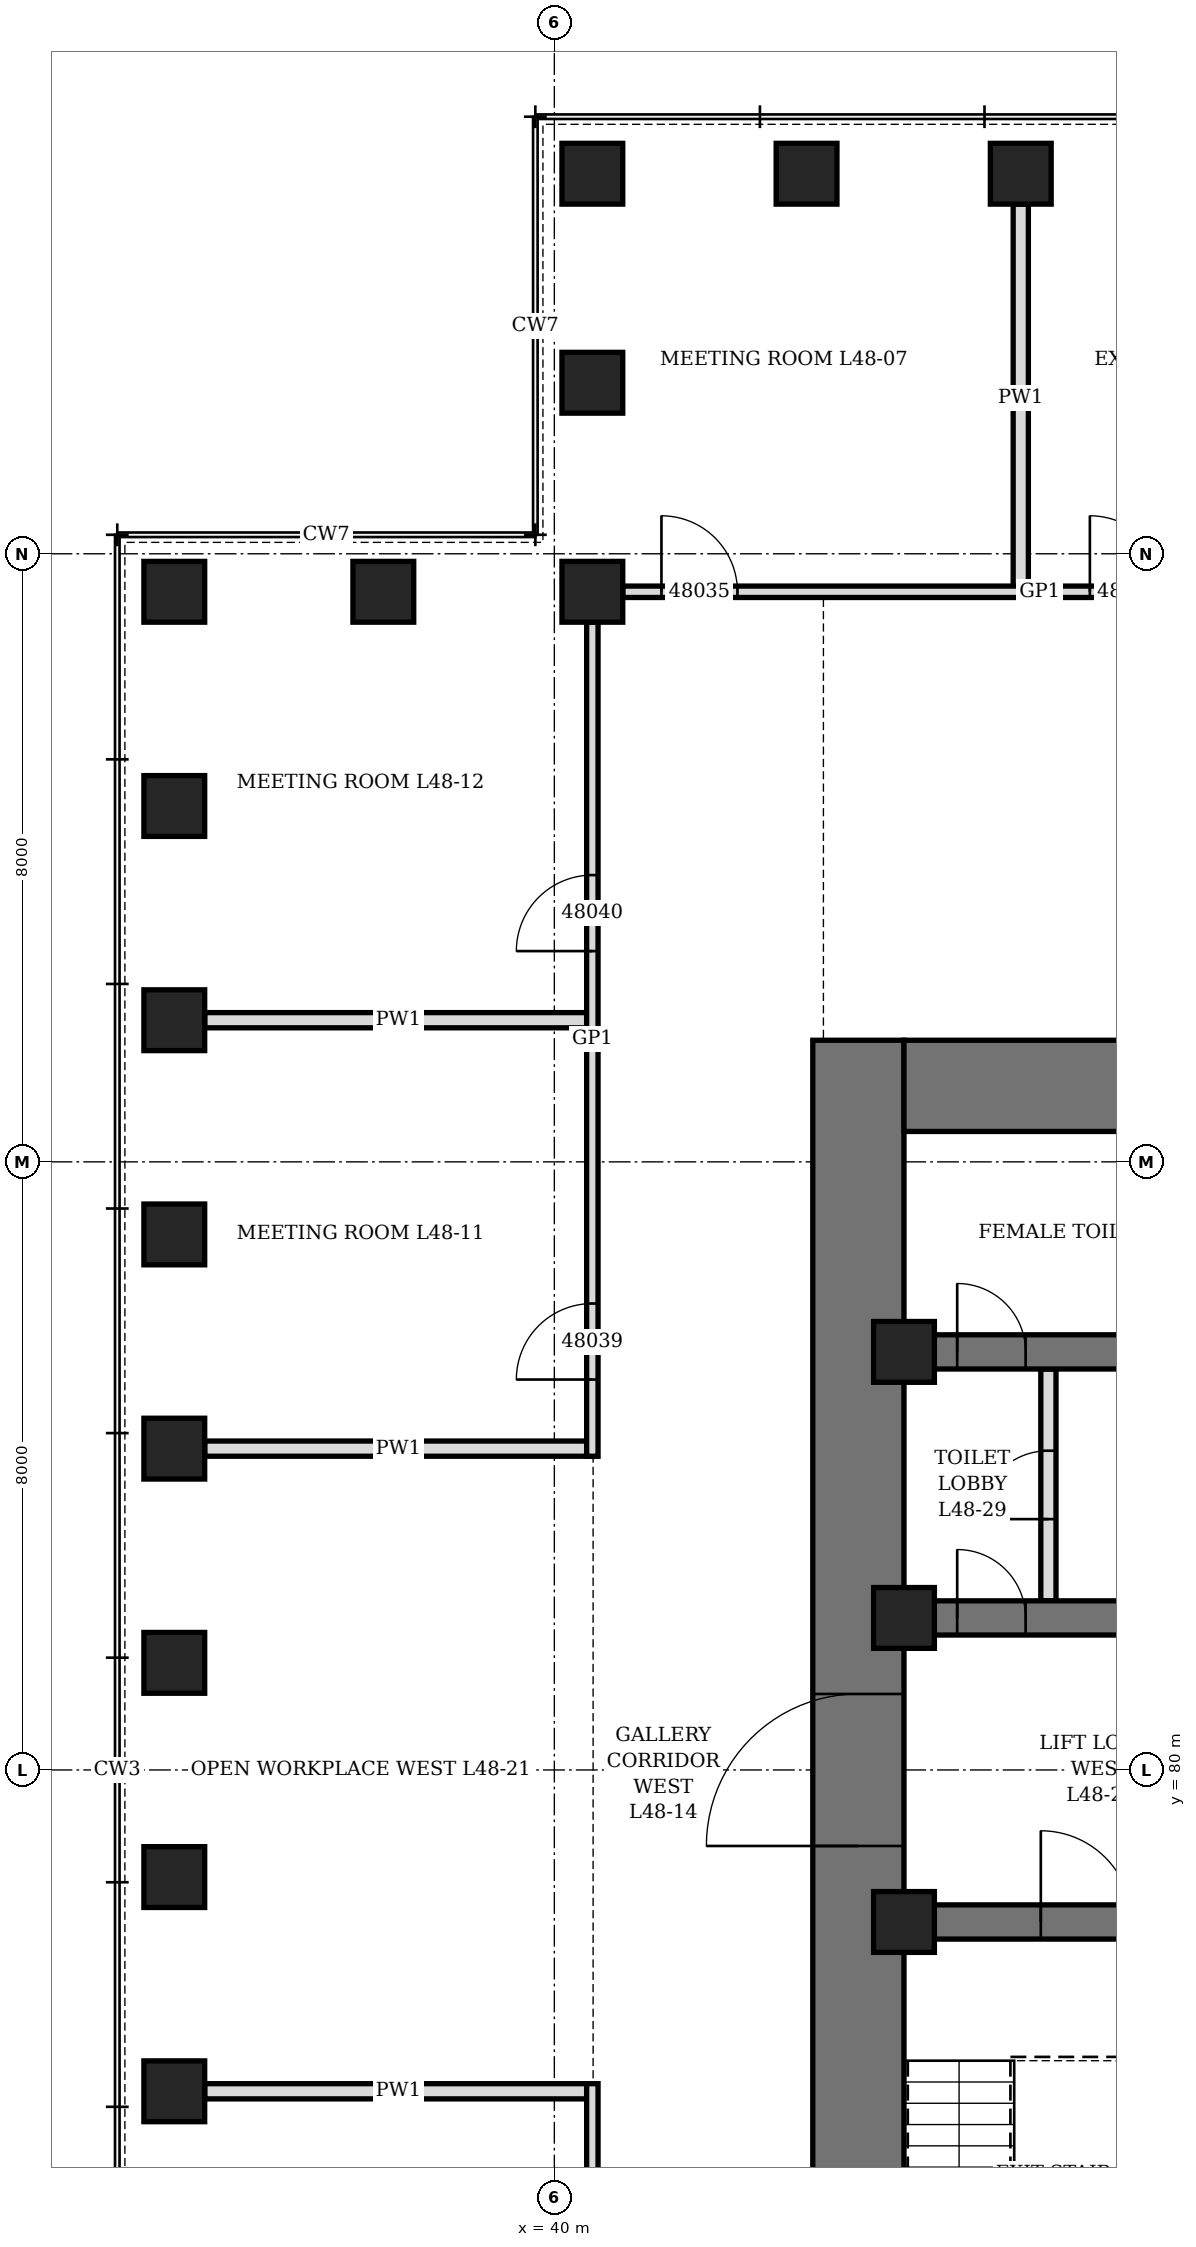
"""IFC4 building model, lengths in metres.
Left out: names, types, materials, properties, quantities, classifications, styles, units other than length and angle.
Written with IfcOpenShell. Run it as: python <this file> out.ifc"""

import sys

from ifc_helpers import new_model, si_unit, direction, frame, frame_2d, origin, origin_2d, place, context, subcontext, project, spatial, rectangle, hollow_rectangle, extrude, element, fill, save


model = new_model("IFC4")
c1 = context("Model", 3, precision=1e-05, world=origin(), true_north=direction((0.0, 1.0)))
c2 = subcontext(c1, "Body", "Model", "MODEL_VIEW")
j1 = project(units=[si_unit("LENGTHUNIT", "METRE"), si_unit("PLANEANGLEUNIT", "RADIAN")], contexts=[c1])
p1 = place(None, origin())
s1 = spatial("IfcSite", under=j1, at=p1, CompositionType="ELEMENT")
p2 = place(p1, origin())
s2 = spatial("IfcBuilding", under=s1, at=p2, CompositionType="ELEMENT")
p3 = place(p2, frame((0.0, 0.0, 214.9)))
s3 = spatial("IfcBuildingStorey", under=s2, at=p3, CompositionType="ELEMENT", Elevation=214.9)
for number, where, z_axis, x_axis in (
    (1, (46.136, 101.0, 0.0), (0.0, 0.0, 1.0), (1.0, 0.0, 0.0)),
    (2, (43.318, 101.0, 0.0), (0.0, 0.0, 1.0), (1.0, 0.0, 0.0)),
    (3, (40.5, 101.0, 0.0), (0.0, 0.0, 1.0), (0.0, 1.0, 0.0)),
    (4, (40.5, 98.25, 0.0), (0.0, 0.0, 1.0), (0.0, 1.0, 0.0)),
    (5, (40.5, 95.5, 0.0), (0.0, 0.0, 1.0), (1.0, 0.0, 0.0)),
    (6, (37.75, 95.5, 0.0), (0.0, 0.0, 1.0), (1.0, 0.0, 0.0)),
    (7, (35.0, 95.5, 0.0), (0.0, 0.0, 1.0), (0.0, 1.0, 0.0)),
    (8, (35.0, 92.682, 0.0), (0.0, 0.0, 1.0), (0.0, 1.0, 0.0)),
    (9, (35.0, 89.864, 0.0), (0.0, 0.0, 1.0), (0.0, 1.0, 0.0)),
    (10, (35.0, 87.045, 0.0), (0.0, 0.0, 1.0), (0.0, 1.0, 0.0)),
    (11, (35.0, 84.227, 0.0), (0.0, 0.0, 1.0), (0.0, 1.0, 0.0)),
    (12, (35.0, 81.409, 0.0), (0.0, 0.0, 1.0), (0.0, 1.0, 0.0)),
    (13, (35.0, 78.591, 0.0), (0.0, 0.0, 1.0), (0.0, 1.0, 0.0)),
    (14, (35.0, 75.773, 0.0), (0.0, 0.0, 1.0), (0.0, 1.0, 0.0)),
):
    element("IfcColumn", number, at=place(p3, frame(where, z_axis=z_axis, x_axis=x_axis)), inside=s3, PredefinedType="COLUMN", context=c2, shape_type="SweptSolid", body=[
        extrude(hollow_rectangle(XDim=0.8, YDim=0.8, WallThickness=0.08, at=origin_2d()), origin(), (0.0, 0.0, 1.0), 4.2),
    ])
p4 = place(p3, frame((44.0, 70.4, 0.0), z_axis=(0.0, 0.0, 1.0), x_axis=(0.0, 1.0, 0.0)))
e15 = element("IfcWall", 15, at=p4, inside=s3, PredefinedType="SHEAR", context=c2, shape_type="SweptSolid", body=[
    extrude(rectangle(XDim=19.2, YDim=1.2, at=frame_2d((9.6, 0.0))), origin(), (0.0, 0.0, 1.0), 4.2),
])
p5 = place(p4, frame((8.6, 0.0, 0.0)))
e16 = element("IfcOpeningElement", 16, at=p5, cuts=e15, PredefinedType="OPENING", context=c2, shape_type="SweptSolid", body=[
    extrude(rectangle(XDim=2.0, YDim=2.4, at=frame_2d((1.0, 1.2))), frame((0.0, 0.61, 0.0), z_axis=(0.0, -1.0, 0.0), x_axis=(1.0, 0.0, 0.0)), (0.0, 0.0, 1.0), 1.22),
])
p6 = place(p3, frame((44.6, 89.0, 0.0), z_axis=(0.0, 0.0, 1.0), x_axis=(1.0, 0.0, 0.0)))
e17 = element("IfcWall", 17, at=p6, inside=s3, PredefinedType="SHEAR", context=c2, shape_type="SweptSolid", body=[
    extrude(rectangle(XDim=22.8, YDim=1.2, at=frame_2d((11.4, 0.0))), origin(), (0.0, 0.0, 1.0), 4.2),
])
p7 = place(p6, frame((7.9, 0.0, 0.0)))
e18 = element("IfcOpeningElement", 18, at=p7, cuts=e17, PredefinedType="OPENING", context=c2, shape_type="SweptSolid", body=[
    extrude(rectangle(XDim=1.0, YDim=2.1, at=frame_2d((0.5, 1.05))), frame((0.0, 0.61, 0.0), z_axis=(0.0, -1.0, 0.0), x_axis=(1.0, 0.0, 0.0)), (0.0, 0.0, 1.0), 1.22),
])
p8 = place(p6, frame((12.025, 0.0, 0.0)))
e19 = element("IfcOpeningElement", 19, at=p8, cuts=e17, PredefinedType="OPENING", context=c2, shape_type="SweptSolid", body=[
    extrude(rectangle(XDim=0.9, YDim=2.1, at=frame_2d((0.45, 1.05))), frame((0.0, 0.61, 0.0), z_axis=(0.0, -1.0, 0.0), x_axis=(1.0, 0.0, 0.0)), (0.0, 0.0, 1.0), 1.22),
])
p9 = place(p6, frame((13.962, 0.0, 0.0)))
e20 = element("IfcOpeningElement", 20, at=p9, cuts=e17, PredefinedType="OPENING", context=c2, shape_type="SweptSolid", body=[
    extrude(rectangle(XDim=0.9, YDim=2.1, at=frame_2d((0.45, 1.05))), frame((0.0, 0.61, 0.0), z_axis=(0.0, -1.0, 0.0), x_axis=(1.0, 0.0, 0.0)), (0.0, 0.0, 1.0), 1.22),
])
p10 = place(p3, frame((44.6, 78.0, 0.0), z_axis=(0.0, 0.0, 1.0), x_axis=(1.0, 0.0, 0.0)))
e21 = element("IfcWall", 21, at=p10, inside=s3, PredefinedType="SHEAR", context=c2, shape_type="SweptSolid", body=[
    extrude(rectangle(XDim=5.175, YDim=0.45, at=frame_2d((2.587, 0.0))), origin(), (0.0, 0.0, 1.0), 4.2),
])
p11 = place(p10, frame((1.8, 0.0, 0.0)))
e22 = element("IfcOpeningElement", 22, at=p11, cuts=e21, PredefinedType="OPENING", context=c2, shape_type="SweptSolid", body=[
    extrude(rectangle(XDim=1.2, YDim=2.1, at=frame_2d((0.6, 1.05))), frame((0.0, 0.235, 0.0), z_axis=(0.0, -1.0, 0.0), x_axis=(1.0, 0.0, 0.0)), (0.0, 0.0, 1.0), 0.47),
])
p12 = place(p3, frame((44.6, 82.0, 0.0), z_axis=(0.0, 0.0, 1.0), x_axis=(1.0, 0.0, 0.0)))
e23 = element("IfcWall", 23, at=p12, inside=s3, PredefinedType="SHEAR", context=c2, shape_type="SweptSolid", body=[
    extrude(rectangle(XDim=5.175, YDim=0.45, at=frame_2d((2.587, 0.0))), origin(), (0.0, 0.0, 1.0), 4.2),
])
p13 = place(p12, frame((0.7, 0.0, 0.0)))
e24 = element("IfcOpeningElement", 24, at=p13, cuts=e23, PredefinedType="OPENING", context=c2, shape_type="SweptSolid", body=[
    extrude(rectangle(XDim=0.9, YDim=2.1, at=frame_2d((0.45, 1.05))), frame((0.0, 0.235, 0.0), z_axis=(0.0, -1.0, 0.0), x_axis=(1.0, 0.0, 0.0)), (0.0, 0.0, 1.0), 0.47),
])
p14 = place(p3, frame((44.6, 85.5, 0.0), z_axis=(0.0, 0.0, 1.0), x_axis=(1.0, 0.0, 0.0)))
e25 = element("IfcWall", 25, at=p14, inside=s3, PredefinedType="SHEAR", context=c2, shape_type="SweptSolid", body=[
    extrude(rectangle(XDim=5.175, YDim=0.45, at=frame_2d((2.587, 0.0))), origin(), (0.0, 0.0, 1.0), 4.2),
])
p15 = place(p14, frame((0.7, 0.0, 0.0)))
e26 = element("IfcOpeningElement", 26, at=p15, cuts=e25, PredefinedType="OPENING", context=c2, shape_type="SweptSolid", body=[
    extrude(rectangle(XDim=0.9, YDim=2.1, at=frame_2d((0.45, 1.05))), frame((0.0, 0.235, 0.0), z_axis=(0.0, -1.0, 0.0), x_axis=(1.0, 0.0, 0.0)), (0.0, 0.0, 1.0), 0.47),
])
for number, where, z_axis, x_axis in (
    (27, (44.6, 78.0, 0.0), (0.0, 0.0, 1.0), (1.0, 0.0, 0.0)),
    (28, (44.6, 82.0, 0.0), (0.0, 0.0, 1.0), (1.0, 0.0, 0.0)),
    (29, (44.6, 85.5, 0.0), (0.0, 0.0, 1.0), (1.0, 0.0, 0.0)),
):
    element("IfcColumn", number, at=place(p3, frame(where, z_axis=z_axis, x_axis=x_axis)), inside=s3, PredefinedType="COLUMN", context=c2, shape_type="SweptSolid", body=[
        extrude(hollow_rectangle(XDim=0.8, YDim=0.8, WallThickness=0.1, at=origin_2d()), origin(), (0.0, 0.0, 1.0), 4.2),
    ])
p16 = place(p3, frame((46.5, 82.225, 0.0), z_axis=(0.0, 0.0, 1.0), x_axis=(0.0, 1.0, 0.0)))
e30 = element("IfcWall", 30, at=p16, inside=s3, PredefinedType="PARTITIONING", context=c2, shape_type="SweptSolid", body=[
    extrude(rectangle(XDim=3.05, YDim=0.2, at=frame_2d((1.525, 0.0))), origin(), (0.0, 0.0, 1.0), 4.04),
])
p17 = place(p16, frame((1.075, 0.0, 0.0)))
e31 = element("IfcOpeningElement", 31, at=p17, cuts=e30, PredefinedType="OPENING", context=c2, shape_type="SweptSolid", body=[
    extrude(rectangle(XDim=0.9, YDim=2.1, at=frame_2d((0.45, 1.05))), frame((0.0, 0.11, 0.0), z_axis=(0.0, -1.0, 0.0), x_axis=(1.0, 0.0, 0.0)), (0.0, 0.0, 1.0), 0.22),
])
for number, where, z_axis, x_axis in (
    (32, (46.136, 95.5, 0.0), (0.0, 0.0, 1.0), (0.0, 1.0, 0.0)),
    (33, (35.4, 75.773, 0.0), (0.0, 0.0, 1.0), (1.0, 0.0, 0.0)),
    (34, (35.4, 84.227, 0.0), (0.0, 0.0, 1.0), (1.0, 0.0, 0.0)),
    (35, (35.4, 89.864, 0.0), (0.0, 0.0, 1.0), (1.0, 0.0, 0.0)),
):
    element("IfcWall", number, at=place(p3, frame(where, z_axis=z_axis, x_axis=x_axis)), inside=s3, PredefinedType="PARTITIONING", context=c2, shape_type="SweptSolid", body=[
        extrude(rectangle(XDim=5.1, YDim=0.2, at=frame_2d((2.55, 0.0))), origin(), (0.0, 0.0, 1.0), 3.428),
    ])
p18 = place(p3, frame((40.9, 95.5, 0.0), z_axis=(0.0, 0.0, 1.0), x_axis=(1.0, 0.0, 0.0)))
e36 = element("IfcWall", 36, at=p18, inside=s3, PredefinedType="PARTITIONING", context=c2, shape_type="SweptSolid", body=[
    extrude(rectangle(XDim=10.973, YDim=0.15, at=frame_2d((5.486, 0.0))), origin(), (0.0, 0.0, 1.0), 4.04),
])
p19 = place(p18, frame((0.509, 0.0, 0.0)))
e37 = element("IfcOpeningElement", 37, at=p19, cuts=e36, PredefinedType="OPENING", context=c2, shape_type="SweptSolid", body=[
    extrude(rectangle(XDim=1.0, YDim=2.4, at=frame_2d((0.5, 1.2))), frame((0.0, 0.085, 0.0), z_axis=(0.0, -1.0, 0.0), x_axis=(1.0, 0.0, 0.0)), (0.0, 0.0, 1.0), 0.17),
])
p20 = place(p18, frame((6.146, 0.0, 0.0)))
e38 = element("IfcOpeningElement", 38, at=p20, cuts=e36, PredefinedType="OPENING", context=c2, shape_type="SweptSolid", body=[
    extrude(rectangle(XDim=1.0, YDim=2.1, at=frame_2d((0.5, 1.05))), frame((0.0, 0.085, 0.0), z_axis=(0.0, -1.0, 0.0), x_axis=(1.0, 0.0, 0.0)), (0.0, 0.0, 1.0), 0.17),
])
p21 = place(p3, frame((40.5, 64.9, 0.0), z_axis=(0.0, 0.0, 1.0), x_axis=(0.0, 1.0, 0.0)))
e39 = element("IfcWall", 39, at=p21, inside=s3, PredefinedType="PARTITIONING", context=c2, shape_type="SweptSolid", body=[
    extrude(rectangle(XDim=10.973, YDim=0.15, at=frame_2d((5.486, 0.0))), origin(), (0.0, 0.0, 1.0), 4.04),
])
p22 = place(p21, frame((3.327, 0.0, 0.0)))
e40 = element("IfcOpeningElement", 40, at=p22, cuts=e39, PredefinedType="OPENING", context=c2, shape_type="SweptSolid", body=[
    extrude(rectangle(XDim=1.0, YDim=2.4, at=frame_2d((0.5, 1.2))), frame((0.0, 0.085, 0.0), z_axis=(0.0, -1.0, 0.0), x_axis=(1.0, 0.0, 0.0)), (0.0, 0.0, 1.0), 0.17),
])
p23 = place(p3, frame((40.5, 84.127, 0.0), z_axis=(0.0, 0.0, 1.0), x_axis=(0.0, 1.0, 0.0)))
e41 = element("IfcWall", 41, at=p23, inside=s3, PredefinedType="PARTITIONING", context=c2, shape_type="SweptSolid", body=[
    extrude(rectangle(XDim=10.973, YDim=0.15, at=frame_2d((5.486, 0.0))), origin(), (0.0, 0.0, 1.0), 4.04),
])
p24 = place(p23, frame((1.009, 0.0, 0.0)))
e42 = element("IfcOpeningElement", 42, at=p24, cuts=e41, PredefinedType="OPENING", context=c2, shape_type="SweptSolid", body=[
    extrude(rectangle(XDim=1.0, YDim=2.4, at=frame_2d((0.5, 1.2))), frame((0.0, 0.085, 0.0), z_axis=(0.0, -1.0, 0.0), x_axis=(1.0, 0.0, 0.0)), (0.0, 0.0, 1.0), 0.17),
])
p25 = place(p23, frame((6.646, 0.0, 0.0)))
e43 = element("IfcOpeningElement", 43, at=p25, cuts=e41, PredefinedType="OPENING", context=c2, shape_type="SweptSolid", body=[
    extrude(rectangle(XDim=1.0, YDim=2.4, at=frame_2d((0.5, 1.2))), frame((0.0, 0.085, 0.0), z_axis=(0.0, -1.0, 0.0), x_axis=(1.0, 0.0, 0.0)), (0.0, 0.0, 1.0), 0.17),
])
p26 = place(p13, origin())
e44 = element("IfcDoor", 44, at=p26, inside=s3, OperationType="SINGLE_SWING_LEFT", PredefinedType="DOOR", context=c2, shape_type="SweptSolid", body=[
    extrude(rectangle(XDim=0.9, YDim=2.1, at=frame_2d((0.45, 1.05))), frame((0.0, 0.225, 0.0), z_axis=(0.0, -1.0, 0.0), x_axis=(1.0, 0.0, 0.0)), (0.0, 0.0, 1.0), 0.449),
])
fill(e24, e44)
p27 = place(p17, origin())
e45 = element("IfcDoor", 45, at=p27, inside=s3, OperationType="SINGLE_SWING_RIGHT", PredefinedType="DOOR", context=c2, shape_type="SweptSolid", body=[
    extrude(rectangle(XDim=0.9, YDim=2.1, at=frame_2d((0.45, 1.05))), frame((0.0, 0.1, 0.0), z_axis=(0.0, -1.0, 0.0), x_axis=(1.0, 0.0, 0.0)), (0.0, 0.0, 1.0), 0.199),
])
fill(e31, e45)
p28 = place(p15, origin())
e46 = element("IfcDoor", 46, at=p28, inside=s3, OperationType="SINGLE_SWING_RIGHT", PredefinedType="DOOR", context=c2, shape_type="SweptSolid", body=[
    extrude(rectangle(XDim=0.9, YDim=2.1, at=frame_2d((0.45, 1.05))), frame((0.0, 0.225, 0.0), z_axis=(0.0, -1.0, 0.0), x_axis=(1.0, 0.0, 0.0)), (0.0, 0.0, 1.0), 0.449),
])
fill(e26, e46)
p29 = place(p11, origin())
e47 = element("IfcDoor", 47, at=p29, inside=s3, OperationType="SINGLE_SWING_LEFT", PredefinedType="DOOR", context=c2, shape_type="SweptSolid", body=[
    extrude(rectangle(XDim=1.2, YDim=2.1, at=frame_2d((0.6, 1.05))), frame((0.0, 0.225, 0.0), z_axis=(0.0, -1.0, 0.0), x_axis=(1.0, 0.0, 0.0)), (0.0, 0.0, 1.0), 0.449),
])
fill(e22, e47)
p30 = place(p5, origin())
e48 = element("IfcDoor", 48, at=p30, inside=s3, OperationType="DOUBLE_DOOR_SINGLE_SWING", PredefinedType="DOOR", context=c2, shape_type="SweptSolid", body=[
    extrude(rectangle(XDim=2.0, YDim=2.4, at=frame_2d((1.0, 1.2))), frame((0.0, 0.35, 0.0), z_axis=(0.0, -1.0, 0.0), x_axis=(1.0, 0.0, 0.0)), (0.0, 0.0, 1.0), 0.7),
])
fill(e16, e48)
p31 = place(p19, origin())
e49 = element("IfcDoor", 49, at=p31, inside=s3, OperationType="SINGLE_SWING_RIGHT", PredefinedType="DOOR", context=c2, shape_type="SweptSolid", body=[
    extrude(rectangle(XDim=1.0, YDim=2.4, at=frame_2d((0.5, 1.2))), frame((0.0, 0.075, 0.0), z_axis=(0.0, -1.0, 0.0), x_axis=(1.0, 0.0, 0.0)), (0.0, 0.0, 1.0), 0.149),
])
fill(e37, e49)
p32 = place(p20, origin())
e50 = element("IfcDoor", 50, at=p32, inside=s3, OperationType="SINGLE_SWING_LEFT", PredefinedType="DOOR", context=c2, shape_type="SweptSolid", body=[
    extrude(rectangle(XDim=1.0, YDim=2.1, at=frame_2d((0.5, 1.05))), frame((0.0, 0.075, 0.0), z_axis=(0.0, -1.0, 0.0), x_axis=(1.0, 0.0, 0.0)), (0.0, 0.0, 1.0), 0.149),
])
fill(e38, e50)
p33 = place(p24, origin())
e51 = element("IfcDoor", 51, at=p33, inside=s3, OperationType="SINGLE_SWING_RIGHT", PredefinedType="DOOR", context=c2, shape_type="SweptSolid", body=[
    extrude(rectangle(XDim=1.0, YDim=2.4, at=frame_2d((0.5, 1.2))), frame((0.0, 0.075, 0.0), z_axis=(0.0, -1.0, 0.0), x_axis=(1.0, 0.0, 0.0)), (0.0, 0.0, 1.0), 0.149),
])
fill(e42, e51)
p34 = place(p25, origin())
e52 = element("IfcDoor", 52, at=p34, inside=s3, OperationType="SINGLE_SWING_RIGHT", PredefinedType="DOOR", context=c2, shape_type="SweptSolid", body=[
    extrude(rectangle(XDim=1.0, YDim=2.4, at=frame_2d((0.5, 1.2))), frame((0.0, 0.075, 0.0), z_axis=(0.0, -1.0, 0.0), x_axis=(1.0, 0.0, 0.0)), (0.0, 0.0, 1.0), 0.149),
])
fill(e43, e52)
save(model, sys.argv[1])
